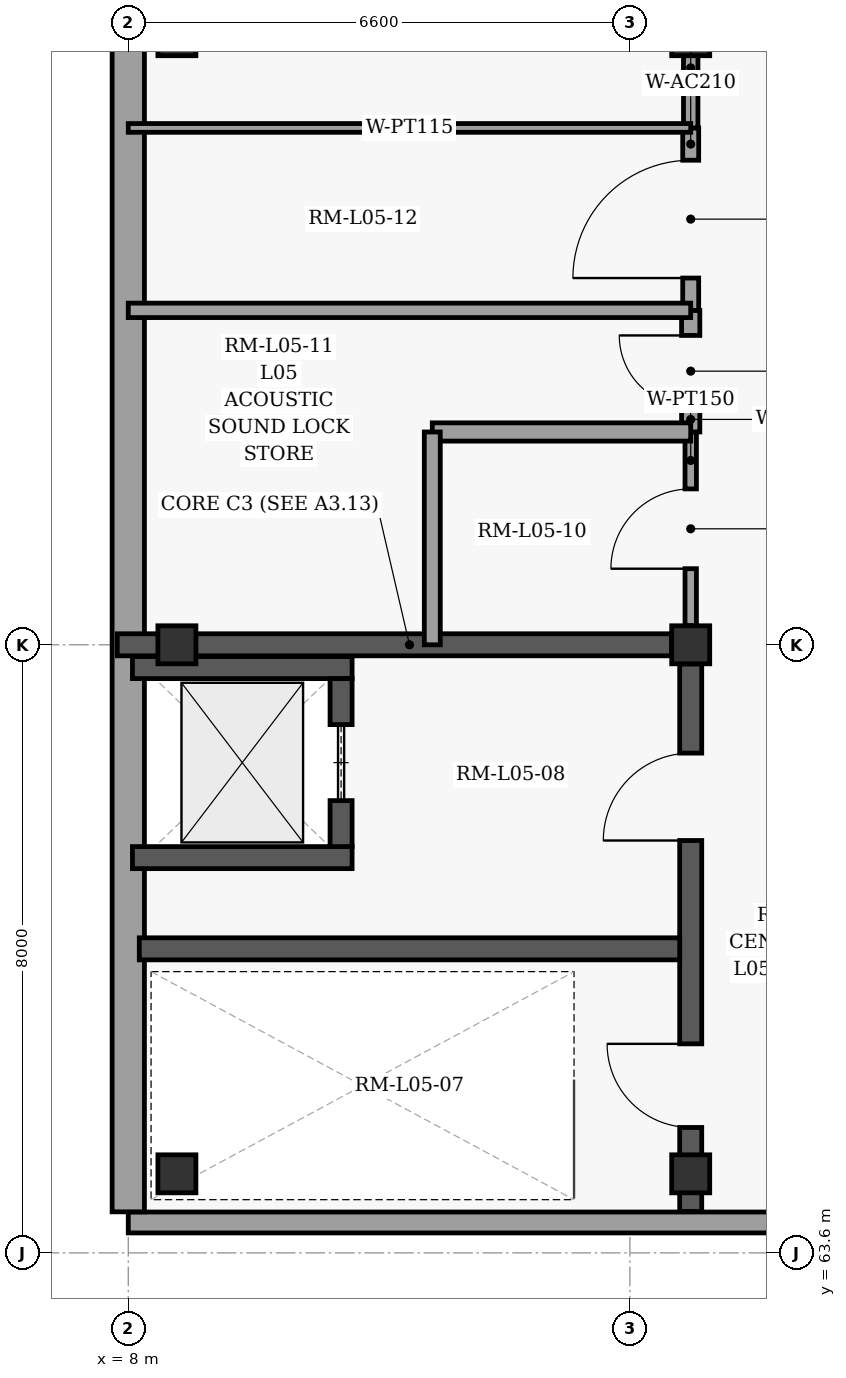
"""IFC4 building model, lengths in metres.
Left out: names, types, materials, properties, quantities, classifications, styles, units other than length and angle.
Written with IfcOpenShell. Run it as: python <this file> out.ifc"""

import sys

from ifc_helpers import new_model, si_unit, direction, frame, frame_2d, origin, origin_2d, place, context, subcontext, project, spatial, rectangle, extrude, element, fill, save


model = new_model("IFC4")
c1 = context("Model", 3, precision=1e-05, world=origin(), true_north=direction((0.0, 1.0)))
c2 = subcontext(c1, "Body", "Model", "MODEL_VIEW")
j1 = project(units=[si_unit("LENGTHUNIT", "METRE"), si_unit("PLANEANGLEUNIT", "RADIAN")], contexts=[c1])
p1 = place(None, origin())
s1 = spatial("IfcSite", under=j1, at=p1, CompositionType="ELEMENT")
p2 = place(p1, origin())
s2 = spatial("IfcBuilding", under=s1, at=p2, CompositionType="ELEMENT")
p3 = place(p2, frame((0.0, 0.0, 24.9)))
s3 = spatial("IfcBuildingStorey", under=s2, at=p3, CompositionType="ELEMENT", Elevation=24.9)
for number, where, z_axis, x_axis in (
    (1, (8.64, 64.64, 0.0), (0.0, 0.0, 1.0), (1.0, 0.0, 0.0)),
    (2, (8.64, 71.6, 0.0), (0.0, 0.0, 1.0), (1.0, 0.0, 0.0)),
    (3, (8.64, 79.6, 0.0), (0.0, 0.0, 1.0), (1.0, 0.0, 0.0)),
    (4, (15.4, 64.64, 0.0), (0.0, 0.0, 1.0), (1.0, 0.0, 0.0)),
    (5, (15.4, 71.6, 0.0), (0.0, 0.0, 1.0), (1.0, 0.0, 0.0)),
    (6, (15.4, 79.6, 0.0), (0.0, 0.0, 1.0), (1.0, 0.0, 0.0)),
):
    element("IfcColumn", number, at=place(p3, frame(where, z_axis=z_axis, x_axis=x_axis)), inside=s3, PredefinedType="COLUMN", context=c2, shape_type="SweptSolid", body=[
        extrude(rectangle(XDim=0.5, YDim=0.5, at=origin_2d()), origin(), (0.0, 0.0, 1.0), 4.5),
    ])
p4 = place(p3, frame((27.0, 64.0, 0.0), z_axis=(0.0, 0.0, 1.0), x_axis=(-1.0, 0.0, 0.0)))
e7 = element("IfcWall", 7, at=p4, inside=s3, PredefinedType="SOLIDWALL", context=c2, shape_type="SweptSolid", body=[
    extrude(rectangle(XDim=19.0, YDim=0.275, at=frame_2d((9.5, 0.0))), origin(), (0.0, 0.0, 1.0), 4.255),
])
p5 = place(p3, frame((8.0, 64.14, 0.0), z_axis=(0.0, 0.0, 1.0), x_axis=(0.0, 1.0, 0.0)))
e8 = element("IfcWall", 8, at=p5, inside=s3, PredefinedType="SOLIDWALL", context=c2, shape_type="SweptSolid", body=[
    extrude(rectangle(XDim=23.32, YDim=0.425, at=frame_2d((11.66, 0.0))), origin(), (0.0, 0.0, 1.0), 4.255),
])
p6 = place(p3, frame((7.855, 71.6, 0.0), z_axis=(0.0, 0.0, 1.0), x_axis=(1.0, 0.0, 0.0)))
e9 = element("IfcWall", 9, at=p6, inside=s3, PredefinedType="SHEAR", context=c2, shape_type="SweptSolid", body=[
    extrude(rectangle(XDim=7.293, YDim=0.29, at=frame_2d((3.646, 0.0))), origin(), (0.0, 0.0, 1.0), 4.255),
])
p7 = place(p3, frame((15.4, 64.145, 0.0), z_axis=(0.0, 0.0, 1.0), x_axis=(0.0, 1.0, 0.0)))
e10 = element("IfcWall", 10, at=p7, inside=s3, PredefinedType="SHEAR", context=c2, shape_type="SweptSolid", body=[
    extrude(rectangle(XDim=7.203, YDim=0.29, at=frame_2d((3.602, 0.0))), origin(), (0.0, 0.0, 1.0), 4.255),
])
p8 = place(p7, frame((1.105, 0.0, 0.0)))
e11 = element("IfcOpeningElement", 11, at=p8, cuts=e10, PredefinedType="OPENING", context=c2, shape_type="SweptSolid", body=[
    extrude(rectangle(XDim=1.1, YDim=2.15, at=frame_2d((0.55, 1.075))), frame((0.0, 0.155, 0.0), z_axis=(0.0, -1.0, 0.0), x_axis=(1.0, 0.0, 0.0)), (0.0, 0.0, 1.0), 0.31),
])
p9 = place(p7, frame((4.88, 0.0, 0.0)))
e12 = element("IfcOpeningElement", 12, at=p9, cuts=e10, PredefinedType="OPENING", context=c2, shape_type="SweptSolid", body=[
    extrude(rectangle(XDim=1.15, YDim=2.2, at=frame_2d((0.575, 1.1))), frame((0.0, 0.155, 0.0), z_axis=(0.0, -1.0, 0.0), x_axis=(1.0, 0.0, 0.0)), (0.0, 0.0, 1.0), 0.31),
])
p10 = place(p3, frame((8.145, 67.6, 0.0), z_axis=(0.0, 0.0, 1.0), x_axis=(1.0, 0.0, 0.0)))
e13 = element("IfcWall", 13, at=p10, inside=s3, PredefinedType="SHEAR", context=c2, shape_type="SweptSolid", body=[
    extrude(rectangle(XDim=7.11, YDim=0.29, at=frame_2d((3.555, 0.0))), origin(), (0.0, 0.0, 1.0), 4.255),
])
for number, where, z_axis, x_axis in (
    (14, (8.055, 68.8, 0.0), (0.0, 0.0, 1.0), (1.0, 0.0, 0.0)),
    (15, (8.055, 71.3, 0.0), (0.0, 0.0, 1.0), (1.0, 0.0, 0.0)),
):
    element("IfcWall", number, at=place(p3, frame(where, z_axis=z_axis, x_axis=x_axis)), inside=s3, PredefinedType="SHEAR", context=c2, shape_type="SweptSolid", body=[
        extrude(rectangle(XDim=2.89, YDim=0.29, at=frame_2d((1.445, 0.0))), origin(), (0.0, 0.0, 1.0), 4.255),
    ])
p11 = place(p3, frame((10.8, 68.945, 0.0), z_axis=(0.0, 0.0, 1.0), x_axis=(0.0, 1.0, 0.0)))
e16 = element("IfcWall", 16, at=p11, inside=s3, PredefinedType="SHEAR", context=c2, shape_type="SweptSolid", body=[
    extrude(rectangle(XDim=2.21, YDim=0.29, at=frame_2d((1.105, 0.0))), origin(), (0.0, 0.0, 1.0), 4.255),
])
p12 = place(p11, frame((0.605, 0.0, 0.0)))
e17 = element("IfcOpeningElement", 17, at=p12, cuts=e16, PredefinedType="OPENING", context=c2, shape_type="SweptSolid", body=[
    extrude(rectangle(XDim=1.0, YDim=2.15, at=frame_2d((0.5, 1.075))), frame((0.0, 0.155, 0.0), z_axis=(0.0, -1.0, 0.0), x_axis=(1.0, 0.0, 0.0)), (0.0, 0.0, 1.0), 0.31),
])
p13 = place(p3, frame((15.4, 71.852, 0.0), z_axis=(0.0, 0.0, 1.0), x_axis=(0.0, 1.0, 0.0)))
e18 = element("IfcWall", 18, at=p13, inside=s3, PredefinedType="PARTITIONING", context=c2, shape_type="SweptSolid", body=[
    extrude(rectangle(XDim=2.548, YDim=0.15, at=frame_2d((1.274, 0.0))), origin(), (0.0, 0.0, 1.0), 3.405),
])
p14 = place(p13, frame((0.749, 0.0, 0.0)))
e19 = element("IfcOpeningElement", 19, at=p14, cuts=e18, PredefinedType="OPENING", context=c2, shape_type="SweptSolid", body=[
    extrude(rectangle(XDim=1.05, YDim=2.15, at=frame_2d((0.525, 1.075))), frame((0.0, 0.085, 0.0), z_axis=(0.0, -1.0, 0.0), x_axis=(1.0, 0.0, 0.0)), (0.0, 0.0, 1.0), 0.17),
])
p15 = place(p3, frame((15.4, 74.4, 0.0), z_axis=(0.0, 0.0, 1.0), x_axis=(0.0, 1.0, 0.0)))
e20 = element("IfcWall", 20, at=p15, inside=s3, PredefinedType="PARTITIONING", context=c2, shape_type="SweptSolid", body=[
    extrude(rectangle(XDim=1.6, YDim=0.24, at=frame_2d((0.8, 0.0))), origin(), (0.0, 0.0, 1.0), 3.405),
])
p16 = place(p15, frame((0.33, 0.0, 0.0)))
e21 = element("IfcOpeningElement", 21, at=p16, cuts=e20, PredefinedType="OPENING", context=c2, shape_type="SweptSolid", body=[
    extrude(rectangle(XDim=0.94, YDim=2.15, at=frame_2d((0.47, 1.075))), frame((0.0, 0.13, 0.0), z_axis=(0.0, -1.0, 0.0), x_axis=(1.0, 0.0, 0.0)), (0.0, 0.0, 1.0), 0.26),
])
p17 = place(p3, frame((15.4, 76.0, 0.0), z_axis=(0.0, 0.0, 1.0), x_axis=(0.0, 1.0, 0.0)))
e22 = element("IfcWall", 22, at=p17, inside=s3, PredefinedType="PARTITIONING", context=c2, shape_type="SweptSolid", body=[
    extrude(rectangle(XDim=2.4, YDim=0.21, at=frame_2d((1.2, 0.0))), origin(), (0.0, 0.0, 1.0), 3.405),
])
p18 = place(p17, frame((0.425, 0.0, 0.0)))
e23 = element("IfcOpeningElement", 23, at=p18, cuts=e22, PredefinedType="OPENING", context=c2, shape_type="SweptSolid", body=[
    extrude(rectangle(XDim=1.55, YDim=2.25, at=frame_2d((0.775, 1.125))), frame((0.0, 0.115, 0.0), z_axis=(0.0, -1.0, 0.0), x_axis=(1.0, 0.0, 0.0)), (0.0, 0.0, 1.0), 0.23),
])
p19 = place(p3, frame((15.4, 78.4, 0.0), z_axis=(0.0, 0.0, 1.0), x_axis=(0.0, 1.0, 0.0)))
e24 = element("IfcWall", 24, at=p19, inside=s3, PredefinedType="PARTITIONING", context=c2, shape_type="SweptSolid", body=[
    extrude(rectangle(XDim=4.0, YDim=0.19, at=frame_2d((2.0, 0.0))), origin(), (0.0, 0.0, 1.0), 3.405),
])
p20 = place(p19, frame((1.58, 0.0, 0.0)))
e25 = element("IfcOpeningElement", 25, at=p20, cuts=e24, PredefinedType="OPENING", context=c2, shape_type="SweptSolid", body=[
    extrude(rectangle(XDim=1.6, YDim=2.3, at=frame_2d((0.8, 1.15))), frame((0.0, 0.105, 0.0), z_axis=(0.0, -1.0, 0.0), x_axis=(1.0, 0.0, 0.0)), (0.0, 0.0, 1.0), 0.21),
])
p21 = place(p3, frame((12.0, 74.4, 0.0), z_axis=(0.0, 0.0, 1.0), x_axis=(1.0, 0.0, 0.0)))
e26 = element("IfcWall", 26, at=p21, inside=s3, PredefinedType="PARTITIONING", context=c2, shape_type="SweptSolid", body=[
    extrude(rectangle(XDim=3.4, YDim=0.24, at=frame_2d((1.7, 0.0))), origin(), (0.0, 0.0, 1.0), 4.255),
])
p22 = place(p3, frame((12.0, 71.6, 0.0), z_axis=(0.0, 0.0, 1.0), x_axis=(0.0, 1.0, 0.0)))
e27 = element("IfcWall", 27, at=p22, inside=s3, PredefinedType="PARTITIONING", context=c2, shape_type="SweptSolid", body=[
    extrude(rectangle(XDim=2.8, YDim=0.21, at=frame_2d((1.4, 0.0))), origin(), (0.0, 0.0, 1.0), 4.255),
])
p23 = place(p3, frame((8.0, 76.0, 0.0), z_axis=(0.0, 0.0, 1.0), x_axis=(1.0, 0.0, 0.0)))
e28 = element("IfcWall", 28, at=p23, inside=s3, PredefinedType="PARTITIONING", context=c2, shape_type="SweptSolid", body=[
    extrude(rectangle(XDim=7.4, YDim=0.19, at=frame_2d((3.7, 0.0))), origin(), (0.0, 0.0, 1.0), 4.255),
])
p24 = place(p3, frame((8.0, 78.4, 0.0), z_axis=(0.0, 0.0, 1.0), x_axis=(1.0, 0.0, 0.0)))
e29 = element("IfcWall", 29, at=p24, inside=s3, PredefinedType="PARTITIONING", context=c2, shape_type="SweptSolid", body=[
    extrude(rectangle(XDim=7.4, YDim=0.115, at=frame_2d((3.7, 0.0))), origin(), (0.0, 0.0, 1.0), 4.255),
])
p25 = place(p8, origin())
e30 = element("IfcDoor", 30, at=p25, inside=s3, OperationType="SINGLE_SWING_RIGHT", PredefinedType="DOOR", context=c2, shape_type="SweptSolid", body=[
    extrude(rectangle(XDim=1.1, YDim=2.15, at=frame_2d((0.55, 1.075))), frame((0.0, 0.025, 0.0), z_axis=(0.0, -1.0, 0.0), x_axis=(1.0, 0.0, 0.0)), (0.0, 0.0, 1.0), 0.05),
])
fill(e11, e30)
p26 = place(p9, origin())
e31 = element("IfcDoor", 31, at=p26, inside=s3, OperationType="SINGLE_SWING_LEFT", PredefinedType="DOOR", context=c2, shape_type="SweptSolid", body=[
    extrude(rectangle(XDim=1.15, YDim=2.2, at=frame_2d((0.575, 1.1))), frame((0.0, 0.025, 0.0), z_axis=(0.0, -1.0, 0.0), x_axis=(1.0, 0.0, 0.0)), (0.0, 0.0, 1.0), 0.05),
])
fill(e12, e31)
p27 = place(p12, origin())
e32 = element("IfcDoor", 32, at=p27, inside=s3, OperationType="SLIDING_TO_LEFT", PredefinedType="DOOR", context=c2, shape_type="SweptSolid", body=[
    extrude(rectangle(XDim=1.0, YDim=2.15, at=frame_2d((0.5, 1.075))), frame((0.0, 0.025, 0.0), z_axis=(0.0, -1.0, 0.0), x_axis=(1.0, 0.0, 0.0)), (0.0, 0.0, 1.0), 0.05),
])
fill(e17, e32)
p28 = place(p14, origin())
e33 = element("IfcDoor", 33, at=p28, inside=s3, OperationType="SINGLE_SWING_LEFT", PredefinedType="DOOR", context=c2, shape_type="SweptSolid", body=[
    extrude(rectangle(XDim=1.05, YDim=2.15, at=frame_2d((0.525, 1.075))), frame((0.0, 0.025, 0.0), z_axis=(0.0, -1.0, 0.0), x_axis=(1.0, 0.0, 0.0)), (0.0, 0.0, 1.0), 0.05),
])
fill(e19, e33)
p29 = place(p16, origin())
e34 = element("IfcDoor", 34, at=p29, inside=s3, OperationType="SINGLE_SWING_RIGHT", PredefinedType="DOOR", context=c2, shape_type="SweptSolid", body=[
    extrude(rectangle(XDim=0.94, YDim=2.15, at=frame_2d((0.47, 1.075))), frame((0.0, 0.025, 0.0), z_axis=(0.0, -1.0, 0.0), x_axis=(1.0, 0.0, 0.0)), (0.0, 0.0, 1.0), 0.05),
])
fill(e21, e34)
p30 = place(p18, origin())
e35 = element("IfcDoor", 35, at=p30, inside=s3, OperationType="SINGLE_SWING_LEFT", PredefinedType="DOOR", context=c2, shape_type="SweptSolid", body=[
    extrude(rectangle(XDim=1.55, YDim=2.25, at=frame_2d((0.775, 1.125))), frame((0.0, 0.025, 0.0), z_axis=(0.0, -1.0, 0.0), x_axis=(1.0, 0.0, 0.0)), (0.0, 0.0, 1.0), 0.05),
])
fill(e23, e35)
save(model, sys.argv[1])
